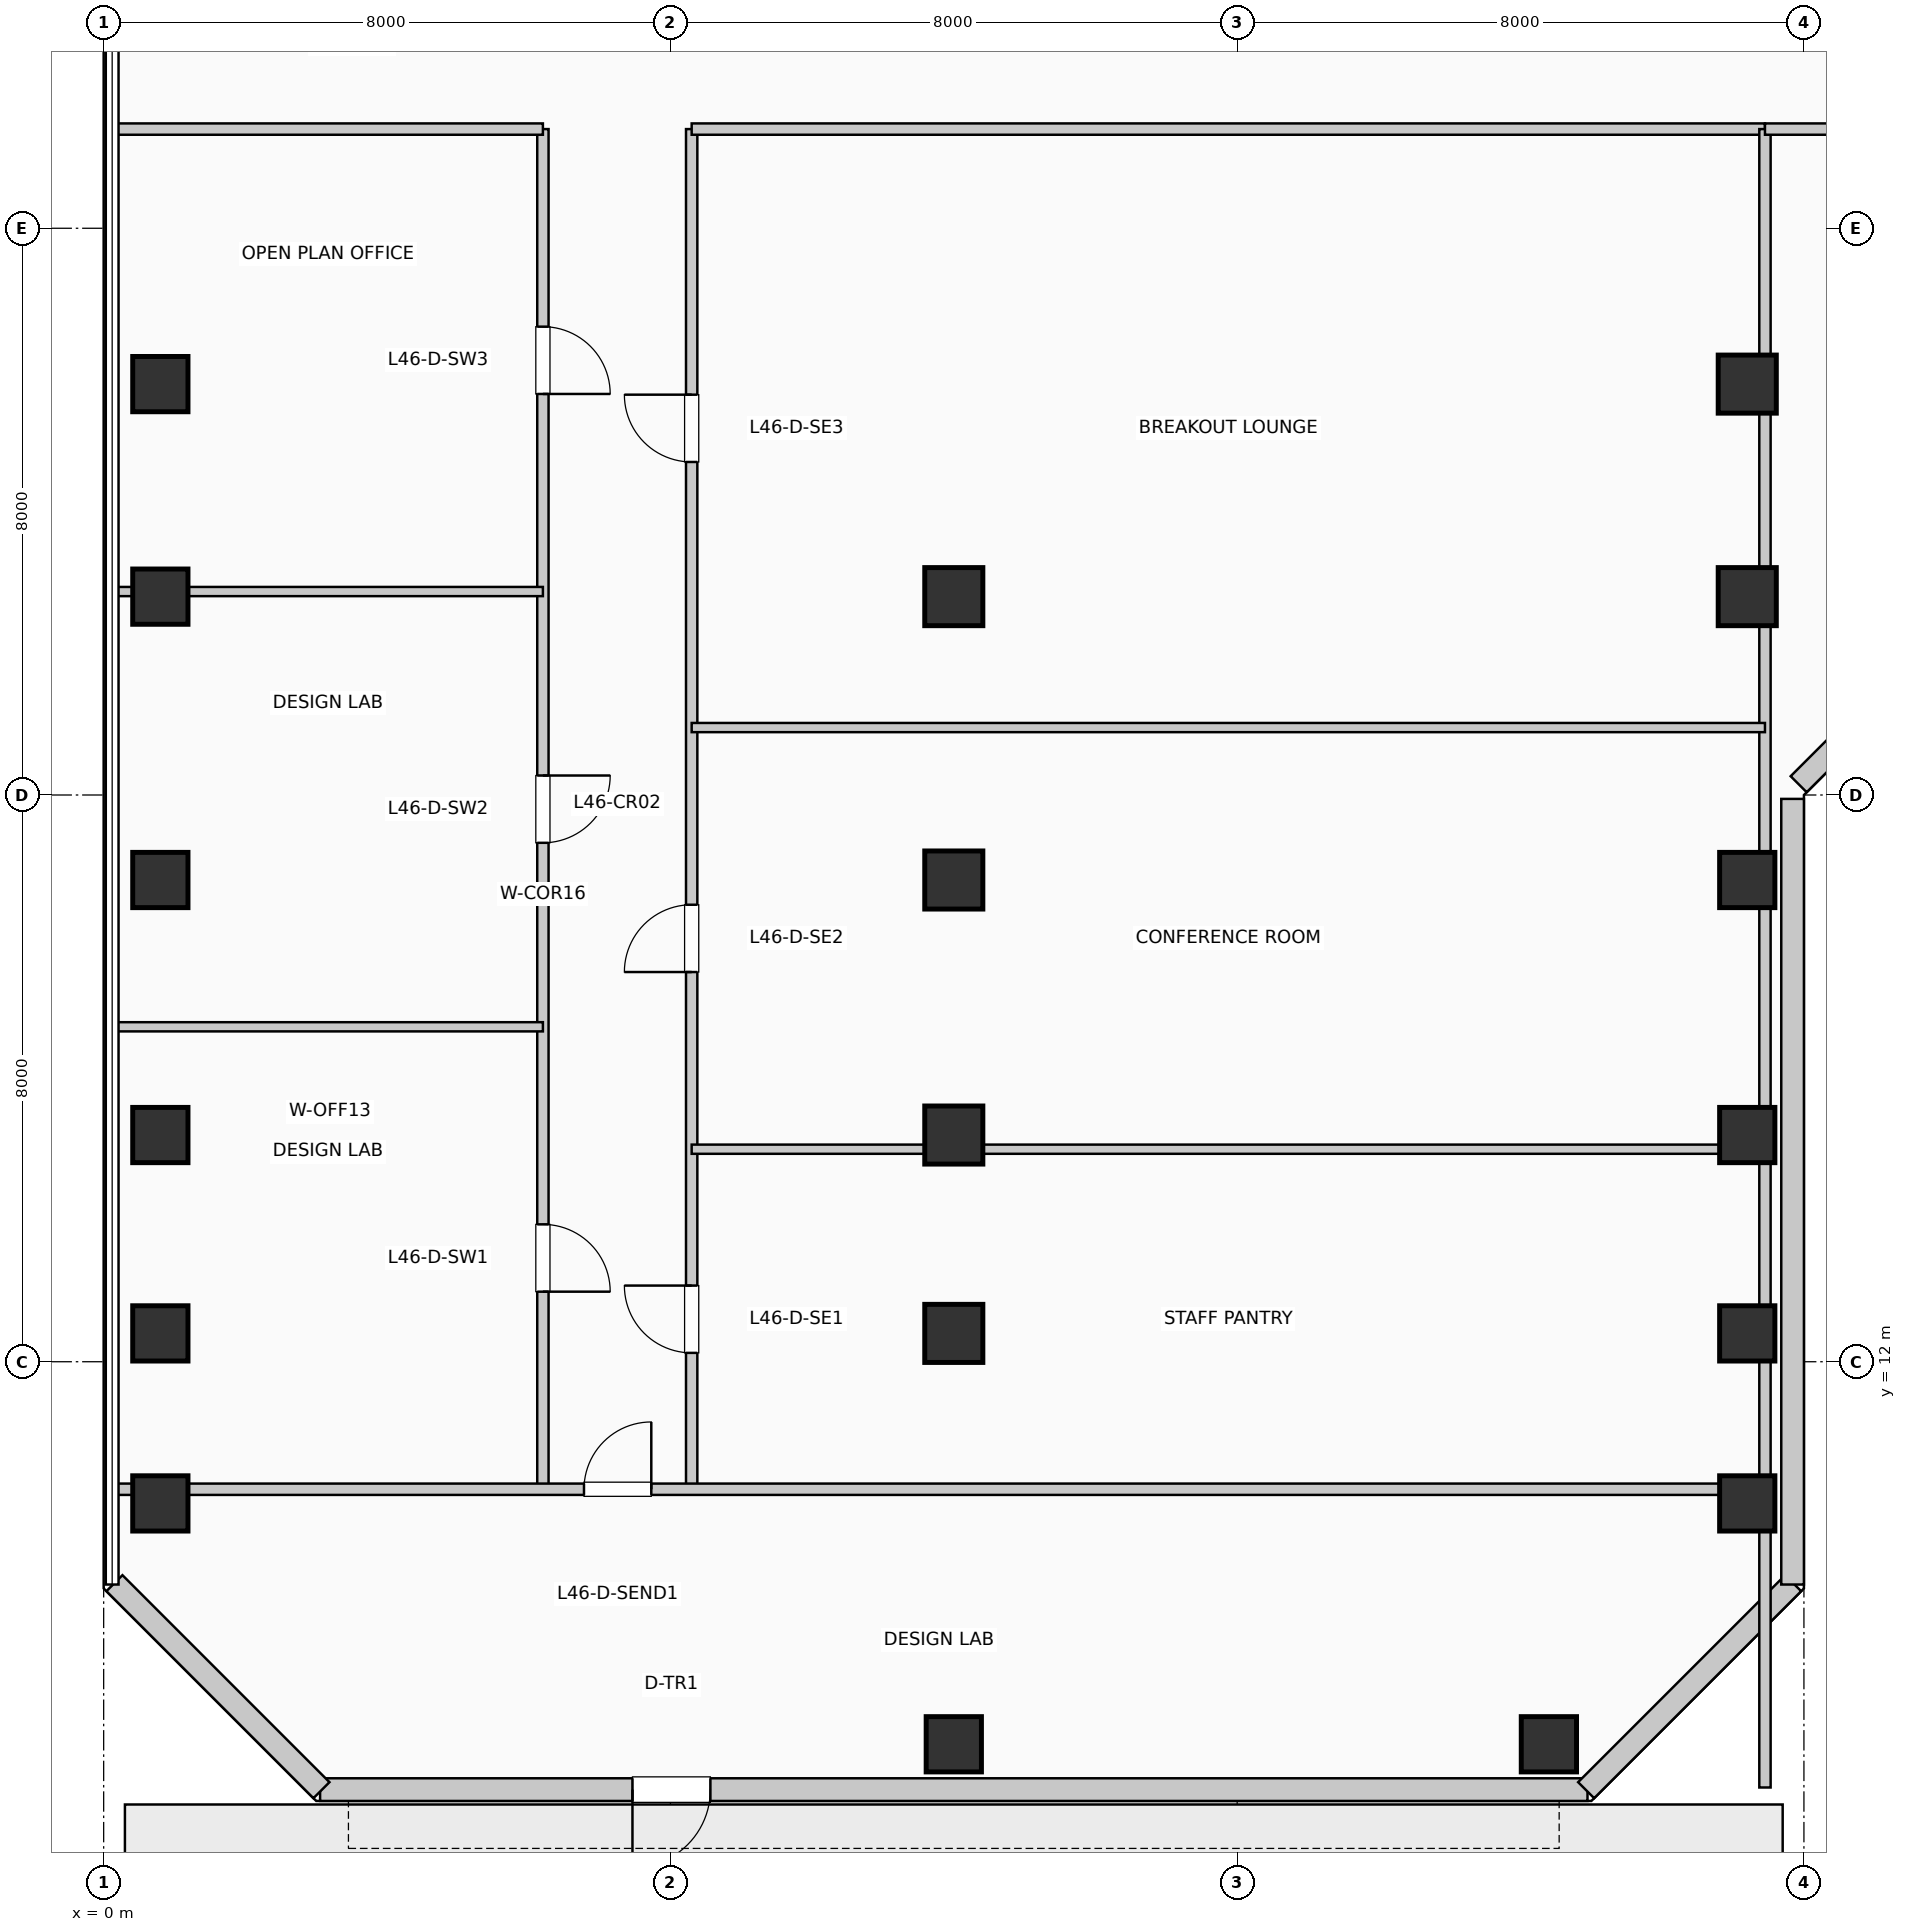
"""IFC4 building model, lengths in metres.
Left out: names, types, materials, properties, quantities, classifications, styles, units other than length and angle.
Written with IfcOpenShell. Run it as: python <this file> out.ifc"""

import sys

from ifc_helpers import new_model, si_unit, direction, frame, frame_2d, origin, origin_2d, place, context, subcontext, project, spatial, rectangle, extrude, element, fill, save


model = new_model("IFC4")
c1 = context("Model", 3, precision=1e-05, world=origin(), true_north=direction((0.0, 1.0)))
c2 = subcontext(c1, "Body", "Model", "MODEL_VIEW")
j1 = project(units=[si_unit("LENGTHUNIT", "METRE"), si_unit("PLANEANGLEUNIT", "RADIAN")], contexts=[c1])
p1 = place(None, origin())
s1 = spatial("IfcSite", under=j1, at=p1, CompositionType="ELEMENT")
p2 = place(p1, origin())
s2 = spatial("IfcBuilding", under=s1, at=p2, CompositionType="ELEMENT")
p3 = place(p2, frame((0.0, 0.0, 191.4)))
s3 = spatial("IfcBuildingStorey", under=s2, at=p3, CompositionType="ELEMENT", Elevation=191.4)
for number, where, z_axis, x_axis in (
    (1, (0.8, 10.0, 0.0), (0.0, 0.0, 1.0), (1.0, 0.0, 0.0)),
    (2, (0.8, 12.4, 0.0), (0.0, 0.0, 1.0), (1.0, 0.0, 0.0)),
    (3, (0.8, 15.2, 0.0), (0.0, 0.0, 1.0), (1.0, 0.0, 0.0)),
    (4, (0.8, 18.8, 0.0), (0.0, 0.0, 1.0), (1.0, 0.0, 0.0)),
    (5, (0.8, 22.8, 0.0), (0.0, 0.0, 1.0), (1.0, 0.0, 0.0)),
    (6, (0.8, 25.8, 0.0), (0.0, 0.0, 1.0), (1.0, 0.0, 0.0)),
    (7, (12.0, 6.6, 0.0), (0.0, 0.0, 1.0), (1.0, 0.0, 0.0)),
):
    element("IfcColumn", number, at=place(p3, frame(where, z_axis=z_axis, x_axis=x_axis)), inside=s3, PredefinedType="COLUMN", context=c2, shape_type="SweptSolid", body=[
        extrude(rectangle(XDim=0.78, YDim=0.78, at=origin_2d()), origin(), (0.0, 0.0, 1.0), 3.96),
    ])
for number, where, z_axis, x_axis in (
    (8, (12.0, 12.4, 0.0), (0.0, 0.0, 1.0), (1.0, 0.0, 0.0)),
    (9, (12.0, 15.2, 0.0), (0.0, 0.0, 1.0), (1.0, 0.0, 0.0)),
    (10, (12.0, 18.8, 0.0), (0.0, 0.0, 1.0), (1.0, 0.0, 0.0)),
    (11, (12.0, 22.8, 0.0), (0.0, 0.0, 1.0), (1.0, 0.0, 0.0)),
):
    element("IfcColumn", number, at=place(p3, frame(where, z_axis=z_axis, x_axis=x_axis)), inside=s3, PredefinedType="COLUMN", context=c2, shape_type="SweptSolid", body=[
        extrude(rectangle(XDim=0.82, YDim=0.82, at=origin_2d()), origin(), (0.0, 0.0, 1.0), 3.96),
    ])
for number, where, z_axis, x_axis in (
    (12, (20.4, 6.6, 0.0), (0.0, 0.0, 1.0), (1.0, 0.0, 0.0)),
    (13, (23.2, 10.0, 0.0), (0.0, 0.0, 1.0), (1.0, 0.0, 0.0)),
    (14, (23.2, 12.4, 0.0), (0.0, 0.0, 1.0), (1.0, 0.0, 0.0)),
    (15, (23.2, 15.2, 0.0), (0.0, 0.0, 1.0), (1.0, 0.0, 0.0)),
    (16, (23.2, 18.8, 0.0), (0.0, 0.0, 1.0), (1.0, 0.0, 0.0)),
):
    element("IfcColumn", number, at=place(p3, frame(where, z_axis=z_axis, x_axis=x_axis)), inside=s3, PredefinedType="COLUMN", context=c2, shape_type="SweptSolid", body=[
        extrude(rectangle(XDim=0.78, YDim=0.78, at=origin_2d()), origin(), (0.0, 0.0, 1.0), 3.96),
    ])
for number, where, z_axis, x_axis in (
    (17, (23.2, 22.8, 0.0), (0.0, 0.0, 1.0), (1.0, 0.0, 0.0)),
    (18, (23.2, 25.8, 0.0), (0.0, 0.0, 1.0), (1.0, 0.0, 0.0)),
):
    element("IfcColumn", number, at=place(p3, frame(where, z_axis=z_axis, x_axis=x_axis)), inside=s3, PredefinedType="COLUMN", context=c2, shape_type="SweptSolid", body=[
        extrude(rectangle(XDim=0.82, YDim=0.82, at=origin_2d()), origin(), (0.0, 0.0, 1.0), 3.96),
    ])
p4 = place(p3, frame((3.055, 5.96, 0.0), z_axis=(0.0, 0.0, 1.0), x_axis=(1.0, 0.0, 0.0)))
e19 = element("IfcWall", 19, at=p4, inside=s3, PredefinedType="SOLIDWALL", context=c2, shape_type="SweptSolid", body=[
    extrude(rectangle(XDim=17.89, YDim=0.32, at=frame_2d((8.945, 0.0))), origin(), (0.0, 0.0, 1.0), 3.71),
])
p5 = place(p4, frame((5.509, 0.0, 0.0), z_axis=(0.0, 0.0, 1.0), x_axis=(-1.0, 0.0, 0.0)))
e20 = element("IfcOpeningElement", 20, at=p5, cuts=e19, PredefinedType="OPENING", context=c2, shape_type="SweptSolid", body=[
    extrude(rectangle(XDim=1.1, YDim=2.2, at=frame_2d((0.55, 1.1))), frame((0.0, 0.17, 0.0), z_axis=(0.0, -1.0, 0.0), x_axis=(1.0, 0.0, 0.0)), (0.0, 0.0, 1.0), 0.34),
])
p6 = place(p3, frame((20.926, 5.952, 0.0), z_axis=(0.0, 0.0, 1.0), x_axis=(0.707077242712, 0.707136318428, 0.0)))
e21 = element("IfcWall", 21, at=p6, inside=s3, PredefinedType="SOLIDWALL", context=c2, shape_type="SweptSolid", body=[
    extrude(rectangle(XDim=4.133, YDim=0.32, at=frame_2d((2.066, 0.0))), origin(), (0.0, 0.0, 1.0), 3.71),
])
p7 = place(p3, frame((23.84, 8.855, 0.0), z_axis=(0.0, 0.0, 1.0), x_axis=(0.0, 1.0, 0.0)))
e22 = element("IfcWall", 22, at=p7, inside=s3, PredefinedType="SOLIDWALL", context=c2, shape_type="SweptSolid", body=[
    extrude(rectangle(XDim=11.09, YDim=0.32, at=frame_2d((5.545, 0.0))), origin(), (0.0, 0.0, 1.0), 3.71),
])
p8 = place(p3, frame((23.926, 20.152, 0.0), z_axis=(0.0, 0.0, 1.0), x_axis=(0.707106781187, 0.707106781187, 0.0)))
e23 = element("IfcWall", 23, at=p8, inside=s3, PredefinedType="SOLIDWALL", context=c2, shape_type="SweptSolid", body=[
    extrude(rectangle(XDim=2.718, YDim=0.32, at=frame_2d((1.359, 0.0))), origin(), (0.0, 0.0, 1.0), 3.71),
])
p9 = place(p3, frame((0.152, 8.874, 0.0), z_axis=(0.0, 0.0, 1.0), x_axis=(0.707077242712, -0.707136318428, 0.0)))
e24 = element("IfcWall", 24, at=p9, inside=s3, PredefinedType="SOLIDWALL", context=c2, shape_type="SweptSolid", body=[
    extrude(rectangle(XDim=4.133, YDim=0.32, at=frame_2d((2.066, 0.0))), origin(), (0.0, 0.0, 1.0), 3.71),
])
p10 = place(p3, frame((6.2, 10.2, 0.0), z_axis=(0.0, 0.0, 1.0), x_axis=(0.0, 1.0, 0.0)))
e25 = element("IfcWall", 25, at=p10, inside=s3, PredefinedType="PARTITIONING", context=c2, shape_type="SweptSolid", body=[
    extrude(rectangle(XDim=19.2, YDim=0.16, at=frame_2d((9.6, 0.0))), origin(), (0.0, 0.0, 1.0), 3.71),
])
p11 = place(p10, frame((3.739, 0.0, 0.0), z_axis=(0.0, 0.0, 1.0), x_axis=(-1.0, 0.0, 0.0)))
e26 = element("IfcOpeningElement", 26, at=p11, cuts=e25, PredefinedType="OPENING", context=c2, shape_type="SweptSolid", body=[
    extrude(rectangle(XDim=0.95, YDim=2.15, at=frame_2d((0.475, 1.075))), frame((0.0, 0.09, 0.0), z_axis=(0.0, -1.0, 0.0), x_axis=(1.0, 0.0, 0.0)), (0.0, 0.0, 1.0), 0.18),
])
p12 = place(p10, frame((10.075, 0.0, 0.0), z_axis=(0.0, 0.0, 1.0), x_axis=(-1.0, 0.0, 0.0)))
e27 = element("IfcOpeningElement", 27, at=p12, cuts=e25, PredefinedType="OPENING", context=c2, shape_type="SweptSolid", body=[
    extrude(rectangle(XDim=0.95, YDim=2.15, at=frame_2d((0.475, 1.075))), frame((0.0, 0.09, 0.0), z_axis=(0.0, -1.0, 0.0), x_axis=(1.0, 0.0, 0.0)), (0.0, 0.0, 1.0), 0.18),
])
p13 = place(p10, frame((16.411, 0.0, 0.0), z_axis=(0.0, 0.0, 1.0), x_axis=(-1.0, 0.0, 0.0)))
e28 = element("IfcOpeningElement", 28, at=p13, cuts=e25, PredefinedType="OPENING", context=c2, shape_type="SweptSolid", body=[
    extrude(rectangle(XDim=0.95, YDim=2.15, at=frame_2d((0.475, 1.075))), frame((0.0, 0.09, 0.0), z_axis=(0.0, -1.0, 0.0), x_axis=(1.0, 0.0, 0.0)), (0.0, 0.0, 1.0), 0.18),
])
p14 = place(p3, frame((8.3, 10.2, 0.0), z_axis=(0.0, 0.0, 1.0), x_axis=(0.0, 1.0, 0.0)))
e29 = element("IfcWall", 29, at=p14, inside=s3, PredefinedType="PARTITIONING", context=c2, shape_type="SweptSolid", body=[
    extrude(rectangle(XDim=19.2, YDim=0.16, at=frame_2d((9.6, 0.0))), origin(), (0.0, 0.0, 1.0), 3.71),
])
p15 = place(p14, frame((1.925, 0.0, 0.0)))
e30 = element("IfcOpeningElement", 30, at=p15, cuts=e29, PredefinedType="OPENING", context=c2, shape_type="SweptSolid", body=[
    extrude(rectangle(XDim=0.95, YDim=2.15, at=frame_2d((0.475, 1.075))), frame((0.0, 0.09, 0.0), z_axis=(0.0, -1.0, 0.0), x_axis=(1.0, 0.0, 0.0)), (0.0, 0.0, 1.0), 0.18),
])
p16 = place(p14, frame((7.301, 0.0, 0.0)))
e31 = element("IfcOpeningElement", 31, at=p16, cuts=e29, PredefinedType="OPENING", context=c2, shape_type="SweptSolid", body=[
    extrude(rectangle(XDim=0.95, YDim=2.15, at=frame_2d((0.475, 1.075))), frame((0.0, 0.09, 0.0), z_axis=(0.0, -1.0, 0.0), x_axis=(1.0, 0.0, 0.0)), (0.0, 0.0, 1.0), 0.18),
])
p17 = place(p14, frame((14.501, 0.0, 0.0)))
e32 = element("IfcOpeningElement", 32, at=p17, cuts=e29, PredefinedType="OPENING", context=c2, shape_type="SweptSolid", body=[
    extrude(rectangle(XDim=0.95, YDim=2.15, at=frame_2d((0.475, 1.075))), frame((0.0, 0.09, 0.0), z_axis=(0.0, -1.0, 0.0), x_axis=(1.0, 0.0, 0.0)), (0.0, 0.0, 1.0), 0.18),
])
p18 = place(p3, frame((0.19, 10.2, 0.0), z_axis=(0.0, 0.0, 1.0), x_axis=(1.0, 0.0, 0.0)))
e33 = element("IfcWall", 33, at=p18, inside=s3, PredefinedType="PARTITIONING", context=c2, shape_type="SweptSolid", body=[
    extrude(rectangle(XDim=23.26, YDim=0.16, at=frame_2d((11.63, 0.0))), origin(), (0.0, 0.0, 1.0), 3.095),
])
p19 = place(p18, frame((6.59, 0.0, 0.0)))
e34 = element("IfcOpeningElement", 34, at=p19, cuts=e33, PredefinedType="OPENING", context=c2, shape_type="SweptSolid", body=[
    extrude(rectangle(XDim=0.95, YDim=2.15, at=frame_2d((0.475, 1.075))), frame((0.0, 0.09, 0.0), z_axis=(0.0, -1.0, 0.0), x_axis=(1.0, 0.0, 0.0)), (0.0, 0.0, 1.0), 0.18),
])
p20 = place(p3, frame((0.19, 29.4, 0.0), z_axis=(0.0, 0.0, 1.0), x_axis=(1.0, 0.0, 0.0)))
e35 = element("IfcWall", 35, at=p20, inside=s3, PredefinedType="PARTITIONING", context=c2, shape_type="SweptSolid", body=[
    extrude(rectangle(XDim=6.01, YDim=0.16, at=frame_2d((3.005, 0.0))), origin(), (0.0, 0.0, 1.0), 3.365),
])
p21 = place(p3, frame((8.3, 29.4, 0.0), z_axis=(0.0, 0.0, 1.0), x_axis=(1.0, 0.0, 0.0)))
e36 = element("IfcWall", 36, at=p21, inside=s3, PredefinedType="PARTITIONING", context=c2, shape_type="SweptSolid", body=[
    extrude(rectangle(XDim=15.15, YDim=0.16, at=frame_2d((7.575, 0.0))), origin(), (0.0, 0.0, 1.0), 3.365),
])
p22 = place(p3, frame((23.45, 5.99, 0.0), z_axis=(0.0, 0.0, 1.0), x_axis=(0.0, 1.0, 0.0)))
e37 = element("IfcWall", 37, at=p22, inside=s3, PredefinedType="PARTITIONING", context=c2, shape_type="SweptSolid", body=[
    extrude(rectangle(XDim=23.41, YDim=0.16, at=frame_2d((11.705, 0.0))), origin(), (0.0, 0.0, 1.0), 3.095),
])
p23 = place(p3, frame((0.19, 16.728, 0.0), z_axis=(0.0, 0.0, 1.0), x_axis=(1.0, 0.0, 0.0)))
e38 = element("IfcWall", 38, at=p23, inside=s3, PredefinedType="PARTITIONING", context=c2, shape_type="SweptSolid", body=[
    extrude(rectangle(XDim=6.01, YDim=0.13, at=frame_2d((3.005, 0.0))), origin(), (0.0, 0.0, 1.0), 3.71),
])
p24 = place(p3, frame((0.19, 22.872, 0.0), z_axis=(0.0, 0.0, 1.0), x_axis=(1.0, 0.0, 0.0)))
e39 = element("IfcWall", 39, at=p24, inside=s3, PredefinedType="PARTITIONING", context=c2, shape_type="SweptSolid", body=[
    extrude(rectangle(XDim=6.01, YDim=0.13, at=frame_2d((3.005, 0.0))), origin(), (0.0, 0.0, 1.0), 3.095),
])
p25 = place(p3, frame((8.3, 15.0, 0.0), z_axis=(0.0, 0.0, 1.0), x_axis=(1.0, 0.0, 0.0)))
e40 = element("IfcWall", 40, at=p25, inside=s3, PredefinedType="PARTITIONING", context=c2, shape_type="SweptSolid", body=[
    extrude(rectangle(XDim=15.15, YDim=0.13, at=frame_2d((7.575, 0.0))), origin(), (0.0, 0.0, 1.0), 3.095),
])
p26 = place(p3, frame((8.3, 20.952, 0.0), z_axis=(0.0, 0.0, 1.0), x_axis=(1.0, 0.0, 0.0)))
e41 = element("IfcWall", 41, at=p26, inside=s3, PredefinedType="PARTITIONING", context=c2, shape_type="SweptSolid", body=[
    extrude(rectangle(XDim=15.15, YDim=0.13, at=frame_2d((7.575, 0.0))), origin(), (0.0, 0.0, 1.0), 3.71),
])
p27 = place(p3, frame((23.45, 29.4, 0.0), z_axis=(0.0, 0.0, 1.0), x_axis=(1.0, 0.0, 0.0)))
e42 = element("IfcWall", 42, at=p27, inside=s3, PredefinedType="PARTITIONING", context=c2, shape_type="SweptSolid", body=[
    extrude(rectangle(XDim=26.56, YDim=0.16, at=frame_2d((13.28, 0.0))), origin(), (0.0, 0.0, 1.0), 3.365),
])
p28 = place(p27, frame((3.928, 0.0, 0.0), z_axis=(0.0, 0.0, 1.0), x_axis=(-1.0, 0.0, 0.0)))
e43 = element("IfcOpeningElement", 43, at=p28, cuts=e42, PredefinedType="OPENING", context=c2, shape_type="SweptSolid", body=[
    extrude(rectangle(XDim=0.95, YDim=2.15, at=frame_2d((0.475, 1.075))), frame((0.0, 0.09, 0.0), z_axis=(0.0, -1.0, 0.0), x_axis=(1.0, 0.0, 0.0)), (0.0, 0.0, 1.0), 0.18),
])
p29 = place(p27, frame((11.365, 0.0, 0.0), z_axis=(0.0, 0.0, 1.0), x_axis=(-1.0, 0.0, 0.0)))
e44 = element("IfcOpeningElement", 44, at=p29, cuts=e42, PredefinedType="OPENING", context=c2, shape_type="SweptSolid", body=[
    extrude(rectangle(XDim=0.95, YDim=2.15, at=frame_2d((0.475, 1.075))), frame((0.0, 0.09, 0.0), z_axis=(0.0, -1.0, 0.0), x_axis=(1.0, 0.0, 0.0)), (0.0, 0.0, 1.0), 0.18),
])
p30 = place(p27, frame((18.801, 0.0, 0.0), z_axis=(0.0, 0.0, 1.0), x_axis=(-1.0, 0.0, 0.0)))
e45 = element("IfcOpeningElement", 45, at=p30, cuts=e42, PredefinedType="OPENING", context=c2, shape_type="SweptSolid", body=[
    extrude(rectangle(XDim=0.95, YDim=2.15, at=frame_2d((0.475, 1.075))), frame((0.0, 0.09, 0.0), z_axis=(0.0, -1.0, 0.0), x_axis=(1.0, 0.0, 0.0)), (0.0, 0.0, 1.0), 0.18),
])
p31 = place(p27, frame((24.645, 0.0, 0.0), z_axis=(0.0, 0.0, 1.0), x_axis=(-1.0, 0.0, 0.0)))
e46 = element("IfcOpeningElement", 46, at=p31, cuts=e42, PredefinedType="OPENING", context=c2, shape_type="SweptSolid", body=[
    extrude(rectangle(XDim=0.95, YDim=2.15, at=frame_2d((0.475, 1.075))), frame((0.0, 0.09, 0.0), z_axis=(0.0, -1.0, 0.0), x_axis=(1.0, 0.0, 0.0)), (0.0, 0.0, 1.0), 0.18),
])
p32 = place(p5, origin())
e47 = element("IfcDoor", 47, at=p32, inside=s3, OperationType="SINGLE_SWING_LEFT", PredefinedType="DOOR", context=c2, shape_type="SweptSolid", body=[
    extrude(rectangle(XDim=1.1, YDim=2.2, at=frame_2d((0.55, 1.1))), frame((0.0, 0.025, 0.0), z_axis=(0.0, -1.0, 0.0), x_axis=(1.0, 0.0, 0.0)), (0.0, 0.0, 1.0), 0.05),
])
fill(e20, e47)
p33 = place(p19, origin())
e48 = element("IfcDoor", 48, at=p33, inside=s3, OperationType="SINGLE_SWING_RIGHT", PredefinedType="DOOR", context=c2, shape_type="SweptSolid", body=[
    extrude(rectangle(XDim=0.95, YDim=2.15, at=frame_2d((0.475, 1.075))), frame((0.0, 0.025, 0.0), z_axis=(0.0, -1.0, 0.0), x_axis=(1.0, 0.0, 0.0)), (0.0, 0.0, 1.0), 0.05),
])
fill(e34, e48)
p34 = place(p11, origin())
e49 = element("IfcDoor", 49, at=p34, inside=s3, OperationType="SINGLE_SWING_LEFT", PredefinedType="DOOR", context=c2, shape_type="SweptSolid", body=[
    extrude(rectangle(XDim=0.95, YDim=2.15, at=frame_2d((0.475, 1.075))), frame((0.0, 0.025, 0.0), z_axis=(0.0, -1.0, 0.0), x_axis=(1.0, 0.0, 0.0)), (0.0, 0.0, 1.0), 0.05),
])
fill(e26, e49)
p35 = place(p12, origin())
e50 = element("IfcDoor", 50, at=p35, inside=s3, OperationType="SINGLE_SWING_RIGHT", PredefinedType="DOOR", context=c2, shape_type="SweptSolid", body=[
    extrude(rectangle(XDim=0.95, YDim=2.15, at=frame_2d((0.475, 1.075))), frame((0.0, 0.025, 0.0), z_axis=(0.0, -1.0, 0.0), x_axis=(1.0, 0.0, 0.0)), (0.0, 0.0, 1.0), 0.05),
])
fill(e27, e50)
p36 = place(p13, origin())
e51 = element("IfcDoor", 51, at=p36, inside=s3, OperationType="SINGLE_SWING_LEFT", PredefinedType="DOOR", context=c2, shape_type="SweptSolid", body=[
    extrude(rectangle(XDim=0.95, YDim=2.15, at=frame_2d((0.475, 1.075))), frame((0.0, 0.025, 0.0), z_axis=(0.0, -1.0, 0.0), x_axis=(1.0, 0.0, 0.0)), (0.0, 0.0, 1.0), 0.05),
])
fill(e28, e51)
p37 = place(p15, origin())
e52 = element("IfcDoor", 52, at=p37, inside=s3, OperationType="SINGLE_SWING_RIGHT", PredefinedType="DOOR", context=c2, shape_type="SweptSolid", body=[
    extrude(rectangle(XDim=0.95, YDim=2.15, at=frame_2d((0.475, 1.075))), frame((0.0, 0.025, 0.0), z_axis=(0.0, -1.0, 0.0), x_axis=(1.0, 0.0, 0.0)), (0.0, 0.0, 1.0), 0.05),
])
fill(e30, e52)
p38 = place(p16, origin())
e53 = element("IfcDoor", 53, at=p38, inside=s3, OperationType="SINGLE_SWING_LEFT", PredefinedType="DOOR", context=c2, shape_type="SweptSolid", body=[
    extrude(rectangle(XDim=0.95, YDim=2.15, at=frame_2d((0.475, 1.075))), frame((0.0, 0.025, 0.0), z_axis=(0.0, -1.0, 0.0), x_axis=(1.0, 0.0, 0.0)), (0.0, 0.0, 1.0), 0.05),
])
fill(e31, e53)
p39 = place(p17, origin())
e54 = element("IfcDoor", 54, at=p39, inside=s3, OperationType="SINGLE_SWING_RIGHT", PredefinedType="DOOR", context=c2, shape_type="SweptSolid", body=[
    extrude(rectangle(XDim=0.95, YDim=2.15, at=frame_2d((0.475, 1.075))), frame((0.0, 0.025, 0.0), z_axis=(0.0, -1.0, 0.0), x_axis=(1.0, 0.0, 0.0)), (0.0, 0.0, 1.0), 0.05),
])
fill(e32, e54)
save(model, sys.argv[1])
